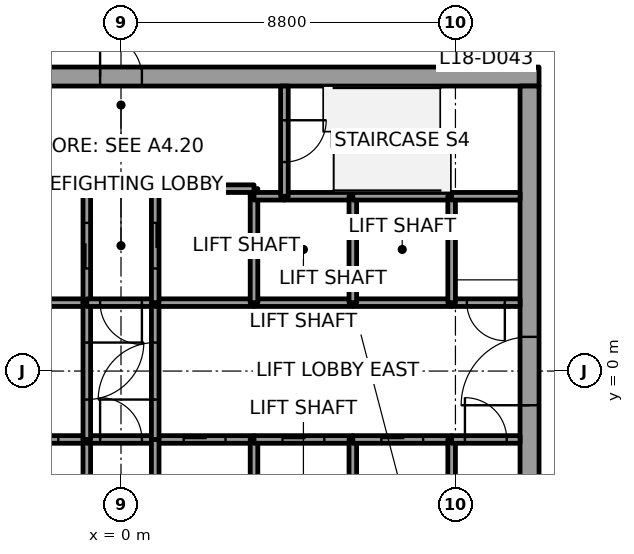
"""IFC4 building model, lengths in metres.
Left out: names, types, materials, properties, quantities, classifications, styles, units other than length and angle.
Written with IfcOpenShell. Run it as: python <this file> out.ifc"""

import sys

from ifc_helpers import new_model, si_unit, direction, frame, frame_2d, origin, place, context, subcontext, project, spatial, rectangle, extrude, element, fill, save


model = new_model("IFC4")
c1 = context("Model", 3, precision=1e-05, world=origin(), true_north=direction((0.0, 1.0)))
c2 = subcontext(c1, "Body", "Model", "MODEL_VIEW")
j1 = project(units=[si_unit("LENGTHUNIT", "METRE"), si_unit("PLANEANGLEUNIT", "RADIAN")], contexts=[c1])
p1 = place(None, origin())
s1 = spatial("IfcSite", under=j1, at=p1, CompositionType="ELEMENT")
p2 = place(p1, origin())
s2 = spatial("IfcBuilding", under=s1, at=p2, CompositionType="ELEMENT")
p3 = place(p2, frame((0.0, 0.0, 88.7)))
s3 = spatial("IfcBuildingStorey", under=s2, at=p3, CompositionType="ELEMENT", Elevation=88.7)
p4 = place(p3, frame((-11.0, 7.75, 0.0), z_axis=(0.0, 0.0, 1.0), x_axis=(1.0, 0.0, 0.0)))
e1 = element("IfcWall", 1, at=p4, inside=s3, PredefinedType="SHEAR", context=c2, shape_type="SweptSolid", body=[
    extrude(rectangle(XDim=22.0, YDim=0.5, at=frame_2d((11.0, 0.0))), origin(), (0.0, 0.0, 1.0), 3.7),
])
p5 = place(p4, frame((10.45, 0.0, 0.0)))
e2 = element("IfcOpeningElement", 2, at=p5, cuts=e1, PredefinedType="OPENING", context=c2, shape_type="SweptSolid", body=[
    extrude(rectangle(XDim=1.1, YDim=2.1, at=frame_2d((0.55, 1.05))), frame((0.0, 0.25, 0.0), z_axis=(0.0, -1.0, 0.0), x_axis=(1.0, 0.0, 0.0)), (0.0, 0.0, 1.0), 0.5),
])
p6 = place(p3, frame((10.75, -7.5, 0.0), z_axis=(0.0, 0.0, 1.0), x_axis=(0.0, 1.0, 0.0)))
e3 = element("IfcWall", 3, at=p6, inside=s3, PredefinedType="SHEAR", context=c2, shape_type="SweptSolid", body=[
    extrude(rectangle(XDim=15.0, YDim=0.5, at=frame_2d((7.5, 0.0))), origin(), (0.0, 0.0, 1.0), 3.7),
])
p7 = place(p6, frame((6.6, 0.0, 0.0)))
e4 = element("IfcOpeningElement", 4, at=p7, cuts=e3, PredefinedType="OPENING", context=c2, shape_type="SweptSolid", body=[
    extrude(rectangle(XDim=1.8, YDim=2.1, at=frame_2d((0.9, 1.05))), frame((0.0, 0.25, 0.0), z_axis=(0.0, -1.0, 0.0), x_axis=(1.0, 0.0, 0.0)), (0.0, 0.0, 1.0), 0.5),
])
p8 = place(p3, frame((-3.5, -1.8, 0.0), z_axis=(0.0, 0.0, 1.0), x_axis=(1.0, 0.0, 0.0)))
e5 = element("IfcWall", 5, at=p8, inside=s3, PredefinedType="SOLIDWALL", context=c2, shape_type="SweptSolid", body=[
    extrude(rectangle(XDim=2.6, YDim=0.2, at=frame_2d((1.3, 0.0))), origin(), (0.0, 0.0, 1.0), 3.55),
])
p9 = place(p8, frame((0.75, 0.0, 0.0)))
e6 = element("IfcOpeningElement", 6, at=p9, cuts=e5, PredefinedType="OPENING", context=c2, shape_type="SweptSolid", body=[
    extrude(rectangle(XDim=1.1, YDim=2.1, at=frame_2d((0.55, 1.05))), frame((0.0, 0.1, 0.0), z_axis=(0.0, -1.0, 0.0), x_axis=(1.0, 0.0, 0.0)), (0.0, 0.0, 1.0), 0.2),
])
p10 = place(p3, frame((-0.9, 1.8, 0.0), z_axis=(0.0, 0.0, 1.0), x_axis=(-1.0, 0.0, 0.0)))
e7 = element("IfcWall", 7, at=p10, inside=s3, PredefinedType="SOLIDWALL", context=c2, shape_type="SweptSolid", body=[
    extrude(rectangle(XDim=2.6, YDim=0.2, at=frame_2d((1.3, 0.0))), origin(), (0.0, 0.0, 1.0), 3.55),
])
p11 = place(p3, frame((-0.9, 1.8, 0.0), z_axis=(0.0, 0.0, 1.0), x_axis=(0.0, 1.0, 0.0)))
e8 = element("IfcWall", 8, at=p11, inside=s3, PredefinedType="SOLIDWALL", context=c2, shape_type="SweptSolid", body=[
    extrude(rectangle(XDim=3.0, YDim=0.2, at=frame_2d((1.5, 0.0))), origin(), (0.0, 0.0, 1.0), 3.55),
])
p12 = place(p11, frame((0.9, 0.0, 0.0)))
e9 = element("IfcOpeningElement", 9, at=p12, cuts=e8, PredefinedType="OPENING", context=c2, shape_type="SweptSolid", body=[
    extrude(rectangle(XDim=1.2, YDim=2.1, at=frame_2d((0.6, 1.05))), frame((0.0, 0.1, 0.0), z_axis=(0.0, -1.0, 0.0), x_axis=(1.0, 0.0, 0.0)), (0.0, 0.0, 1.0), 0.2),
])
p13 = place(p3, frame((-0.9, 4.8, 0.0), z_axis=(0.0, 0.0, 1.0), x_axis=(-1.0, 0.0, 0.0)))
e10 = element("IfcWall", 10, at=p13, inside=s3, PredefinedType="SOLIDWALL", context=c2, shape_type="SweptSolid", body=[
    extrude(rectangle(XDim=2.6, YDim=0.2, at=frame_2d((1.3, 0.0))), origin(), (0.0, 0.0, 1.0), 3.55),
])
p14 = place(p3, frame((-0.9, -4.6, 0.0), z_axis=(0.0, 0.0, 1.0), x_axis=(0.0, 1.0, 0.0)))
e11 = element("IfcWall", 11, at=p14, inside=s3, PredefinedType="SOLIDWALL", context=c2, shape_type="SweptSolid", body=[
    extrude(rectangle(XDim=2.8, YDim=0.2, at=frame_2d((1.4, 0.0))), origin(), (0.0, 0.0, 1.0), 3.55),
])
p15 = place(p3, frame((-0.9, -1.8, 0.0), z_axis=(0.0, 0.0, 1.0), x_axis=(1.0, 0.0, 0.0)))
e12 = element("IfcWall", 12, at=p15, inside=s3, PredefinedType="SOLIDWALL", context=c2, shape_type="SweptSolid", body=[
    extrude(rectangle(XDim=1.8, YDim=0.2, at=frame_2d((0.9, 0.0))), origin(), (0.0, 0.0, 1.0), 3.55),
])
p16 = place(p15, frame((0.35, 0.0, 0.0)))
e13 = element("IfcOpeningElement", 13, at=p16, cuts=e12, PredefinedType="OPENING", context=c2, shape_type="SweptSolid", body=[
    extrude(rectangle(XDim=1.1, YDim=2.1, at=frame_2d((0.55, 1.05))), frame((0.0, 0.1, 0.0), z_axis=(0.0, -1.0, 0.0), x_axis=(1.0, 0.0, 0.0)), (0.0, 0.0, 1.0), 0.2),
])
p17 = place(p3, frame((-0.9, 1.8, 0.0), z_axis=(0.0, 0.0, 1.0), x_axis=(0.0, -1.0, 0.0)))
e14 = element("IfcWall", 14, at=p17, inside=s3, PredefinedType="SOLIDWALL", context=c2, shape_type="SweptSolid", body=[
    extrude(rectangle(XDim=3.6, YDim=0.2, at=frame_2d((1.8, 0.0))), origin(), (0.0, 0.0, 1.0), 3.55),
])
p18 = place(p17, frame((1.05, 0.0, 0.0)))
e15 = element("IfcOpeningElement", 15, at=p18, cuts=e14, PredefinedType="OPENING", context=c2, shape_type="SweptSolid", body=[
    extrude(rectangle(XDim=1.5, YDim=2.1, at=frame_2d((0.75, 1.05))), frame((0.0, 0.1, 0.0), z_axis=(0.0, -1.0, 0.0), x_axis=(1.0, 0.0, 0.0)), (0.0, 0.0, 1.0), 0.2),
])
p19 = place(p3, frame((0.9, 1.8, 0.0), z_axis=(0.0, 0.0, 1.0), x_axis=(-1.0, 0.0, 0.0)))
e16 = element("IfcWall", 16, at=p19, inside=s3, PredefinedType="SOLIDWALL", context=c2, shape_type="SweptSolid", body=[
    extrude(rectangle(XDim=1.8, YDim=0.2, at=frame_2d((0.9, 0.0))), origin(), (0.0, 0.0, 1.0), 3.55),
])
p20 = place(p19, frame((0.35, 0.0, 0.0)))
e17 = element("IfcOpeningElement", 17, at=p20, cuts=e16, PredefinedType="OPENING", context=c2, shape_type="SweptSolid", body=[
    extrude(rectangle(XDim=1.1, YDim=2.1, at=frame_2d((0.55, 1.05))), frame((0.0, 0.1, 0.0), z_axis=(0.0, -1.0, 0.0), x_axis=(1.0, 0.0, 0.0)), (0.0, 0.0, 1.0), 0.2),
])
p21 = place(p3, frame((0.9, -1.8, 0.0), z_axis=(0.0, 0.0, 1.0), x_axis=(1.0, 0.0, 0.0)))
e18 = element("IfcWall", 18, at=p21, inside=s3, PredefinedType="SOLIDWALL", context=c2, shape_type="SweptSolid", body=[
    extrude(rectangle(XDim=2.6, YDim=0.2, at=frame_2d((1.3, 0.0))), origin(), (0.0, 0.0, 1.0), 3.55),
])
p22 = place(p21, frame((0.75, 0.0, 0.0)))
e19 = element("IfcOpeningElement", 19, at=p22, cuts=e18, PredefinedType="OPENING", context=c2, shape_type="SweptSolid", body=[
    extrude(rectangle(XDim=1.1, YDim=2.1, at=frame_2d((0.55, 1.05))), frame((0.0, 0.1, 0.0), z_axis=(0.0, -1.0, 0.0), x_axis=(1.0, 0.0, 0.0)), (0.0, 0.0, 1.0), 0.2),
])
p23 = place(p3, frame((0.9, -1.8, 0.0), z_axis=(0.0, 0.0, 1.0), x_axis=(0.0, 1.0, 0.0)))
e20 = element("IfcWall", 20, at=p23, inside=s3, PredefinedType="SOLIDWALL", context=c2, shape_type="SweptSolid", body=[
    extrude(rectangle(XDim=3.6, YDim=0.2, at=frame_2d((1.8, 0.0))), origin(), (0.0, 0.0, 1.0), 3.55),
])
p24 = place(p23, frame((1.05, 0.0, 0.0)))
e21 = element("IfcOpeningElement", 21, at=p24, cuts=e20, PredefinedType="OPENING", context=c2, shape_type="SweptSolid", body=[
    extrude(rectangle(XDim=1.5, YDim=2.1, at=frame_2d((0.75, 1.05))), frame((0.0, 0.1, 0.0), z_axis=(0.0, -1.0, 0.0), x_axis=(1.0, 0.0, 0.0)), (0.0, 0.0, 1.0), 0.2),
])
p25 = place(p3, frame((0.9, -1.8, 0.0), z_axis=(0.0, 0.0, 1.0), x_axis=(0.0, -1.0, 0.0)))
e22 = element("IfcWall", 22, at=p25, inside=s3, PredefinedType="SOLIDWALL", context=c2, shape_type="SweptSolid", body=[
    extrude(rectangle(XDim=2.8, YDim=0.2, at=frame_2d((1.4, 0.0))), origin(), (0.0, 0.0, 1.0), 3.55),
])
p26 = place(p3, frame((3.5, 1.8, 0.0), z_axis=(0.0, 0.0, 1.0), x_axis=(-1.0, 0.0, 0.0)))
e23 = element("IfcWall", 23, at=p26, inside=s3, PredefinedType="SOLIDWALL", context=c2, shape_type="SweptSolid", body=[
    extrude(rectangle(XDim=2.6, YDim=0.2, at=frame_2d((1.3, 0.0))), origin(), (0.0, 0.0, 1.0), 3.55),
])
p27 = place(p3, frame((3.5, 4.6, 0.0), z_axis=(0.0, 0.0, 1.0), x_axis=(0.0, 1.0, 0.0)))
e24 = element("IfcWall", 24, at=p27, inside=s3, PredefinedType="SOLIDWALL", context=c2, shape_type="SweptSolid", body=[
    extrude(rectangle(XDim=0.2, YDim=0.2, at=frame_2d((0.1, 0.0))), origin(), (0.0, 0.0, 1.0), 3.55),
])
p28 = place(p3, frame((3.5, 4.8, 0.0), z_axis=(0.0, 0.0, 1.0), x_axis=(-1.0, 0.0, 0.0)))
e25 = element("IfcWall", 25, at=p28, inside=s3, PredefinedType="SOLIDWALL", context=c2, shape_type="SweptSolid", body=[
    extrude(rectangle(XDim=2.6, YDim=0.2, at=frame_2d((1.3, 0.0))), origin(), (0.0, 0.0, 1.0), 3.55),
])
p29 = place(p3, frame((0.9, 4.8, 0.0), z_axis=(0.0, 0.0, 1.0), x_axis=(0.0, -1.0, 0.0)))
e26 = element("IfcWall", 26, at=p29, inside=s3, PredefinedType="SOLIDWALL", context=c2, shape_type="SweptSolid", body=[
    extrude(rectangle(XDim=3.0, YDim=0.2, at=frame_2d((1.5, 0.0))), origin(), (0.0, 0.0, 1.0), 3.55),
])
p30 = place(p29, frame((0.9, 0.0, 0.0)))
e27 = element("IfcOpeningElement", 27, at=p30, cuts=e26, PredefinedType="OPENING", context=c2, shape_type="SweptSolid", body=[
    extrude(rectangle(XDim=1.2, YDim=2.1, at=frame_2d((0.6, 1.05))), frame((0.0, 0.1, 0.0), z_axis=(0.0, -1.0, 0.0), x_axis=(1.0, 0.0, 0.0)), (0.0, 0.0, 1.0), 0.2),
])
p31 = place(p3, frame((3.5, -4.6, 0.0), z_axis=(0.0, 0.0, 1.0), x_axis=(0.0, 1.0, 0.0)))
e28 = element("IfcWall", 28, at=p31, inside=s3, PredefinedType="SOLIDWALL", context=c2, shape_type="SweptSolid", body=[
    extrude(rectangle(XDim=2.8, YDim=0.2, at=frame_2d((1.4, 0.0))), origin(), (0.0, 0.0, 1.0), 3.55),
])
p32 = place(p3, frame((3.5, -1.8, 0.0), z_axis=(0.0, 0.0, 1.0), x_axis=(1.0, 0.0, 0.0)))
e29 = element("IfcWall", 29, at=p32, inside=s3, PredefinedType="SOLIDWALL", context=c2, shape_type="SweptSolid", body=[
    extrude(rectangle(XDim=2.6, YDim=0.2, at=frame_2d((1.3, 0.0))), origin(), (0.0, 0.0, 1.0), 3.55),
])
p33 = place(p32, frame((0.75, 0.0, 0.0)))
e30 = element("IfcOpeningElement", 30, at=p33, cuts=e29, PredefinedType="OPENING", context=c2, shape_type="SweptSolid", body=[
    extrude(rectangle(XDim=1.1, YDim=2.1, at=frame_2d((0.55, 1.05))), frame((0.0, 0.1, 0.0), z_axis=(0.0, -1.0, 0.0), x_axis=(1.0, 0.0, 0.0)), (0.0, 0.0, 1.0), 0.2),
])
p34 = place(p3, frame((6.1, 1.8, 0.0), z_axis=(0.0, 0.0, 1.0), x_axis=(-1.0, 0.0, 0.0)))
e31 = element("IfcWall", 31, at=p34, inside=s3, PredefinedType="SOLIDWALL", context=c2, shape_type="SweptSolid", body=[
    extrude(rectangle(XDim=2.6, YDim=0.2, at=frame_2d((1.3, 0.0))), origin(), (0.0, 0.0, 1.0), 3.55),
])
p35 = place(p3, frame((3.5, 1.8, 0.0), z_axis=(0.0, 0.0, 1.0), x_axis=(0.0, 1.0, 0.0)))
e32 = element("IfcWall", 32, at=p35, inside=s3, PredefinedType="SOLIDWALL", context=c2, shape_type="SweptSolid", body=[
    extrude(rectangle(XDim=2.8, YDim=0.2, at=frame_2d((1.4, 0.0))), origin(), (0.0, 0.0, 1.0), 3.55),
])
p36 = place(p3, frame((4.3, 4.6, 0.0), z_axis=(0.0, 0.0, 1.0), x_axis=(-1.0, 0.0, 0.0)))
e33 = element("IfcWall", 33, at=p36, inside=s3, PredefinedType="SOLIDWALL", context=c2, shape_type="SweptSolid", body=[
    extrude(rectangle(XDim=0.8, YDim=0.2, at=frame_2d((0.4, 0.0))), origin(), (0.0, 0.0, 1.0), 3.55),
])
p37 = place(p3, frame((6.1, 4.6, 0.0), z_axis=(0.0, 0.0, 1.0), x_axis=(-1.0, 0.0, 0.0)))
e34 = element("IfcWall", 34, at=p37, inside=s3, PredefinedType="SOLIDWALL", context=c2, shape_type="SweptSolid", body=[
    extrude(rectangle(XDim=1.8, YDim=0.2, at=frame_2d((0.9, 0.0))), origin(), (0.0, 0.0, 1.0), 3.55),
])
p38 = place(p3, frame((4.3, 7.5, 0.0), z_axis=(0.0, 0.0, 1.0), x_axis=(0.0, -1.0, 0.0)))
e35 = element("IfcWall", 35, at=p38, inside=s3, PredefinedType="SOLIDWALL", context=c2, shape_type="SweptSolid", body=[
    extrude(rectangle(XDim=2.9, YDim=0.2, at=frame_2d((1.45, 0.0))), origin(), (0.0, 0.0, 1.0), 3.55),
])
p39 = place(p38, frame((0.9, 0.0, 0.0)))
e36 = element("IfcOpeningElement", 36, at=p39, cuts=e35, PredefinedType="OPENING", context=c2, shape_type="SweptSolid", body=[
    extrude(rectangle(XDim=1.1, YDim=2.1, at=frame_2d((0.55, 1.05))), frame((0.0, 0.1, 0.0), z_axis=(0.0, -1.0, 0.0), x_axis=(1.0, 0.0, 0.0)), (0.0, 0.0, 1.0), 0.2),
])
p40 = place(p3, frame((6.1, -4.6, 0.0), z_axis=(0.0, 0.0, 1.0), x_axis=(0.0, 1.0, 0.0)))
e37 = element("IfcWall", 37, at=p40, inside=s3, PredefinedType="SOLIDWALL", context=c2, shape_type="SweptSolid", body=[
    extrude(rectangle(XDim=2.8, YDim=0.2, at=frame_2d((1.4, 0.0))), origin(), (0.0, 0.0, 1.0), 3.55),
])
p41 = place(p3, frame((6.1, -1.8, 0.0), z_axis=(0.0, 0.0, 1.0), x_axis=(1.0, 0.0, 0.0)))
e38 = element("IfcWall", 38, at=p41, inside=s3, PredefinedType="SOLIDWALL", context=c2, shape_type="SweptSolid", body=[
    extrude(rectangle(XDim=2.6, YDim=0.2, at=frame_2d((1.3, 0.0))), origin(), (0.0, 0.0, 1.0), 3.55),
])
p42 = place(p41, frame((0.75, 0.0, 0.0)))
e39 = element("IfcOpeningElement", 39, at=p42, cuts=e38, PredefinedType="OPENING", context=c2, shape_type="SweptSolid", body=[
    extrude(rectangle(XDim=1.1, YDim=2.1, at=frame_2d((0.55, 1.05))), frame((0.0, 0.1, 0.0), z_axis=(0.0, -1.0, 0.0), x_axis=(1.0, 0.0, 0.0)), (0.0, 0.0, 1.0), 0.2),
])
p43 = place(p3, frame((8.7, 1.8, 0.0), z_axis=(0.0, 0.0, 1.0), x_axis=(-1.0, 0.0, 0.0)))
e40 = element("IfcWall", 40, at=p43, inside=s3, PredefinedType="SOLIDWALL", context=c2, shape_type="SweptSolid", body=[
    extrude(rectangle(XDim=2.6, YDim=0.2, at=frame_2d((1.3, 0.0))), origin(), (0.0, 0.0, 1.0), 3.55),
])
p44 = place(p3, frame((6.1, 1.8, 0.0), z_axis=(0.0, 0.0, 1.0), x_axis=(0.0, 1.0, 0.0)))
e41 = element("IfcWall", 41, at=p44, inside=s3, PredefinedType="SOLIDWALL", context=c2, shape_type="SweptSolid", body=[
    extrude(rectangle(XDim=2.8, YDim=0.2, at=frame_2d((1.4, 0.0))), origin(), (0.0, 0.0, 1.0), 3.55),
])
p45 = place(p3, frame((8.7, 4.6, 0.0), z_axis=(0.0, 0.0, 1.0), x_axis=(-1.0, 0.0, 0.0)))
e42 = element("IfcWall", 42, at=p45, inside=s3, PredefinedType="SOLIDWALL", context=c2, shape_type="SweptSolid", body=[
    extrude(rectangle(XDim=2.6, YDim=0.2, at=frame_2d((1.3, 0.0))), origin(), (0.0, 0.0, 1.0), 3.55),
])
p46 = place(p3, frame((8.7, -1.8, 0.0), z_axis=(0.0, 0.0, 1.0), x_axis=(0.0, -1.0, 0.0)))
e43 = element("IfcWall", 43, at=p46, inside=s3, PredefinedType="SOLIDWALL", context=c2, shape_type="SweptSolid", body=[
    extrude(rectangle(XDim=2.8, YDim=0.2, at=frame_2d((1.4, 0.0))), origin(), (0.0, 0.0, 1.0), 3.55),
])
p47 = place(p3, frame((8.7, -1.8, 0.0), z_axis=(0.0, 0.0, 1.0), x_axis=(1.0, 0.0, 0.0)))
e44 = element("IfcWall", 44, at=p47, inside=s3, PredefinedType="SOLIDWALL", context=c2, shape_type="SweptSolid", body=[
    extrude(rectangle(XDim=1.8, YDim=0.2, at=frame_2d((0.9, 0.0))), origin(), (0.0, 0.0, 1.0), 3.55),
])
p48 = place(p47, frame((0.35, 0.0, 0.0)))
e45 = element("IfcOpeningElement", 45, at=p48, cuts=e44, PredefinedType="OPENING", context=c2, shape_type="SweptSolid", body=[
    extrude(rectangle(XDim=1.1, YDim=2.1, at=frame_2d((0.55, 1.05))), frame((0.0, 0.1, 0.0), z_axis=(0.0, -1.0, 0.0), x_axis=(1.0, 0.0, 0.0)), (0.0, 0.0, 1.0), 0.2),
])
p49 = place(p3, frame((10.5, 1.8, 0.0), z_axis=(0.0, 0.0, 1.0), x_axis=(-1.0, 0.0, 0.0)))
e46 = element("IfcWall", 46, at=p49, inside=s3, PredefinedType="SOLIDWALL", context=c2, shape_type="SweptSolid", body=[
    extrude(rectangle(XDim=1.8, YDim=0.2, at=frame_2d((0.9, 0.0))), origin(), (0.0, 0.0, 1.0), 3.55),
])
p50 = place(p49, frame((0.4, 0.0, 0.0)))
e47 = element("IfcOpeningElement", 47, at=p50, cuts=e46, PredefinedType="OPENING", context=c2, shape_type="SweptSolid", body=[
    extrude(rectangle(XDim=1.0, YDim=2.1, at=frame_2d((0.5, 1.05))), frame((0.0, 0.1, 0.0), z_axis=(0.0, -1.0, 0.0), x_axis=(1.0, 0.0, 0.0)), (0.0, 0.0, 1.0), 0.2),
])
p51 = place(p3, frame((8.7, 4.6, 0.0), z_axis=(0.0, 0.0, 1.0), x_axis=(0.0, -1.0, 0.0)))
e48 = element("IfcWall", 48, at=p51, inside=s3, PredefinedType="SOLIDWALL", context=c2, shape_type="SweptSolid", body=[
    extrude(rectangle(XDim=2.8, YDim=0.2, at=frame_2d((1.4, 0.0))), origin(), (0.0, 0.0, 1.0), 3.55),
])
p52 = place(p3, frame((10.5, 4.6, 0.0), z_axis=(0.0, 0.0, 1.0), x_axis=(-1.0, 0.0, 0.0)))
e49 = element("IfcWall", 49, at=p52, inside=s3, PredefinedType="SOLIDWALL", context=c2, shape_type="SweptSolid", body=[
    extrude(rectangle(XDim=1.8, YDim=0.2, at=frame_2d((0.9, 0.0))), origin(), (0.0, 0.0, 1.0), 3.55),
])
p53 = place(p9, origin())
e50 = element("IfcDoor", 50, at=p53, inside=s3, OperationType="SLIDING_TO_RIGHT", PredefinedType="DOOR", context=c2, shape_type="SweptSolid", body=[
    extrude(rectangle(XDim=1.1, YDim=2.1, at=frame_2d((0.55, 1.05))), frame((0.0, 0.025, 0.0), z_axis=(0.0, -1.0, 0.0), x_axis=(1.0, 0.0, 0.0)), (0.0, 0.0, 1.0), 0.05),
])
fill(e6, e50)
p54 = place(p22, origin())
e51 = element("IfcDoor", 51, at=p54, inside=s3, OperationType="SLIDING_TO_RIGHT", PredefinedType="DOOR", context=c2, shape_type="SweptSolid", body=[
    extrude(rectangle(XDim=1.1, YDim=2.1, at=frame_2d((0.55, 1.05))), frame((0.0, 0.025, 0.0), z_axis=(0.0, -1.0, 0.0), x_axis=(1.0, 0.0, 0.0)), (0.0, 0.0, 1.0), 0.05),
])
fill(e19, e51)
p55 = place(p33, origin())
e52 = element("IfcDoor", 52, at=p55, inside=s3, OperationType="SLIDING_TO_LEFT", PredefinedType="DOOR", context=c2, shape_type="SweptSolid", body=[
    extrude(rectangle(XDim=1.1, YDim=2.1, at=frame_2d((0.55, 1.05))), frame((0.0, 0.025, 0.0), z_axis=(0.0, -1.0, 0.0), x_axis=(1.0, 0.0, 0.0)), (0.0, 0.0, 1.0), 0.05),
])
fill(e30, e52)
p56 = place(p42, origin())
e53 = element("IfcDoor", 53, at=p56, inside=s3, OperationType="SLIDING_TO_LEFT", PredefinedType="DOOR", context=c2, shape_type="SweptSolid", body=[
    extrude(rectangle(XDim=1.1, YDim=2.1, at=frame_2d((0.55, 1.05))), frame((0.0, 0.025, 0.0), z_axis=(0.0, -1.0, 0.0), x_axis=(1.0, 0.0, 0.0)), (0.0, 0.0, 1.0), 0.05),
])
fill(e39, e53)
p57 = place(p12, origin())
e54 = element("IfcDoor", 54, at=p57, inside=s3, OperationType="SLIDING_TO_LEFT", PredefinedType="DOOR", context=c2, shape_type="SweptSolid", body=[
    extrude(rectangle(XDim=1.2, YDim=2.1, at=frame_2d((0.6, 1.05))), frame((0.0, 0.025, 0.0), z_axis=(0.0, -1.0, 0.0), x_axis=(1.0, 0.0, 0.0)), (0.0, 0.0, 1.0), 0.05),
])
fill(e9, e54)
p58 = place(p30, origin())
e55 = element("IfcDoor", 55, at=p58, inside=s3, OperationType="SLIDING_TO_LEFT", PredefinedType="DOOR", context=c2, shape_type="SweptSolid", body=[
    extrude(rectangle(XDim=1.2, YDim=2.1, at=frame_2d((0.6, 1.05))), frame((0.0, 0.025, 0.0), z_axis=(0.0, -1.0, 0.0), x_axis=(1.0, 0.0, 0.0)), (0.0, 0.0, 1.0), 0.05),
])
fill(e27, e55)
p59 = place(p18, origin())
e56 = element("IfcDoor", 56, at=p59, inside=s3, OperationType="DOUBLE_DOOR_SINGLE_SWING", PredefinedType="DOOR", context=c2, shape_type="SweptSolid", body=[
    extrude(rectangle(XDim=1.5, YDim=2.1, at=frame_2d((0.75, 1.05))), frame((0.0, 0.025, 0.0), z_axis=(0.0, -1.0, 0.0), x_axis=(1.0, 0.0, 0.0)), (0.0, 0.0, 1.0), 0.05),
])
fill(e15, e56)
p60 = place(p24, origin())
e57 = element("IfcDoor", 57, at=p60, inside=s3, OperationType="DOUBLE_DOOR_SINGLE_SWING", PredefinedType="DOOR", context=c2, shape_type="SweptSolid", body=[
    extrude(rectangle(XDim=1.5, YDim=2.1, at=frame_2d((0.75, 1.05))), frame((0.0, 0.025, 0.0), z_axis=(0.0, -1.0, 0.0), x_axis=(1.0, 0.0, 0.0)), (0.0, 0.0, 1.0), 0.05),
])
fill(e21, e57)
p61 = place(p48, origin())
e58 = element("IfcDoor", 58, at=p61, inside=s3, OperationType="SINGLE_SWING_RIGHT", PredefinedType="DOOR", context=c2, shape_type="SweptSolid", body=[
    extrude(rectangle(XDim=1.1, YDim=2.1, at=frame_2d((0.55, 1.05))), frame((0.0, 0.025, 0.0), z_axis=(0.0, -1.0, 0.0), x_axis=(1.0, 0.0, 0.0)), (0.0, 0.0, 1.0), 0.05),
])
fill(e45, e58)
p62 = place(p20, origin())
e59 = element("IfcDoor", 59, at=p62, inside=s3, OperationType="SINGLE_SWING_LEFT", PredefinedType="DOOR", context=c2, shape_type="SweptSolid", body=[
    extrude(rectangle(XDim=1.1, YDim=2.1, at=frame_2d((0.55, 1.05))), frame((0.0, 0.025, 0.0), z_axis=(0.0, -1.0, 0.0), x_axis=(1.0, 0.0, 0.0)), (0.0, 0.0, 1.0), 0.05),
])
fill(e17, e59)
p63 = place(p16, origin())
e60 = element("IfcDoor", 60, at=p63, inside=s3, OperationType="SINGLE_SWING_RIGHT", PredefinedType="DOOR", context=c2, shape_type="SweptSolid", body=[
    extrude(rectangle(XDim=1.1, YDim=2.1, at=frame_2d((0.55, 1.05))), frame((0.0, 0.025, 0.0), z_axis=(0.0, -1.0, 0.0), x_axis=(1.0, 0.0, 0.0)), (0.0, 0.0, 1.0), 0.05),
])
fill(e13, e60)
p64 = place(p50, origin())
e61 = element("IfcDoor", 61, at=p64, inside=s3, OperationType="SINGLE_SWING_RIGHT", PredefinedType="DOOR", context=c2, shape_type="SweptSolid", body=[
    extrude(rectangle(XDim=1.0, YDim=2.1, at=frame_2d((0.5, 1.05))), frame((0.0, 0.025, 0.0), z_axis=(0.0, -1.0, 0.0), x_axis=(1.0, 0.0, 0.0)), (0.0, 0.0, 1.0), 0.05),
])
fill(e47, e61)
p65 = place(p39, origin())
e62 = element("IfcDoor", 62, at=p65, inside=s3, OperationType="SINGLE_SWING_LEFT", PredefinedType="DOOR", context=c2, shape_type="SweptSolid", body=[
    extrude(rectangle(XDim=1.1, YDim=2.1, at=frame_2d((0.55, 1.05))), frame((0.0, 0.025, 0.0), z_axis=(0.0, -1.0, 0.0), x_axis=(1.0, 0.0, 0.0)), (0.0, 0.0, 1.0), 0.05),
])
fill(e36, e62)
p66 = place(p7, origin())
e63 = element("IfcDoor", 63, at=p66, inside=s3, OperationType="DOUBLE_DOOR_SINGLE_SWING", PredefinedType="DOOR", context=c2, shape_type="SweptSolid", body=[
    extrude(rectangle(XDim=1.8, YDim=2.1, at=frame_2d((0.9, 1.05))), frame((0.0, 0.025, 0.0), z_axis=(0.0, -1.0, 0.0), x_axis=(1.0, 0.0, 0.0)), (0.0, 0.0, 1.0), 0.05),
])
fill(e4, e63)
p67 = place(p5, origin())
e64 = element("IfcDoor", 64, at=p67, inside=s3, OperationType="SINGLE_SWING_RIGHT", PredefinedType="DOOR", context=c2, shape_type="SweptSolid", body=[
    extrude(rectangle(XDim=1.1, YDim=2.1, at=frame_2d((0.55, 1.05))), frame((0.0, 0.025, 0.0), z_axis=(0.0, -1.0, 0.0), x_axis=(1.0, 0.0, 0.0)), (0.0, 0.0, 1.0), 0.05),
])
fill(e2, e64)
save(model, sys.argv[1])
